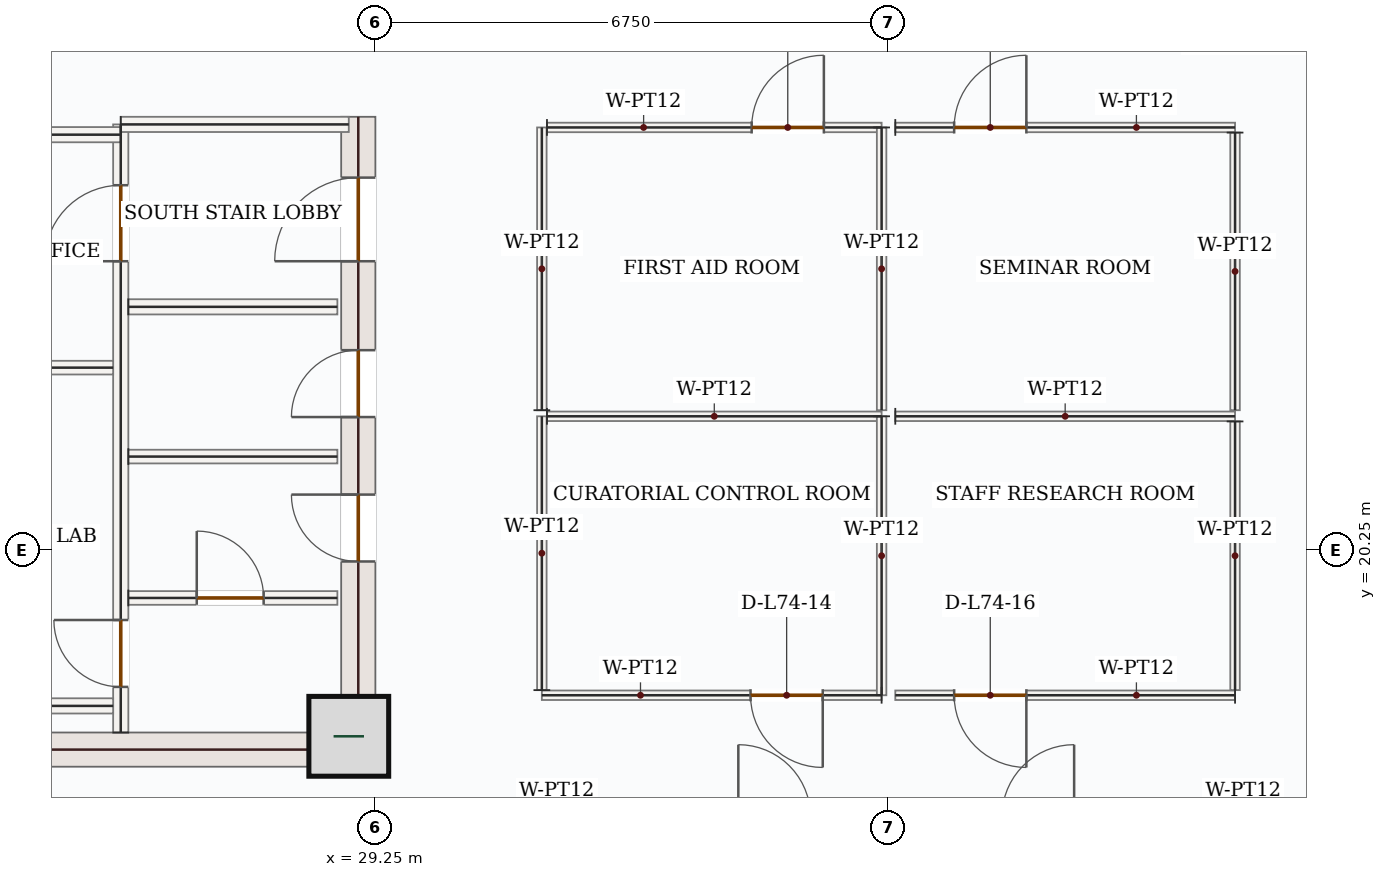
"""IFC4 building model, lengths in metres.
Left out: names, types, materials, properties, quantities, classifications, styles, units other than length and angle.
Written with IfcOpenShell. Run it as: python <this file> out.ifc"""

import sys

from ifc_helpers import new_model, si_unit, direction, frame, frame_2d, origin, origin_2d, place, context, subcontext, project, spatial, rectangle, extrude, source, transform, mapped, element, fill, save


model = new_model("IFC4")
c1 = context("Model", 3, precision=1e-05, world=origin(), true_north=direction((0.0, 1.0)))
c2 = subcontext(c1, "Body", "Model", "MODEL_VIEW")
j1 = project(units=[si_unit("LENGTHUNIT", "METRE"), si_unit("PLANEANGLEUNIT", "RADIAN")], contexts=[c1])
p1 = place(None, origin())
s1 = spatial("IfcSite", under=j1, at=p1, CompositionType="ELEMENT")
p2 = place(p1, origin())
s2 = spatial("IfcBuilding", under=s1, at=p2, CompositionType="ELEMENT")
p3 = place(p2, frame((0.0, 0.0, 306.6)))
s3 = spatial("IfcBuildingStorey", under=s2, at=p3, CompositionType="ELEMENT", Elevation=306.6)
p4 = place(p3, frame((29.025, 17.4, 0.0), z_axis=(0.0, 0.0, 1.0), x_axis=(0.0, 1.0, 0.0)))
e1 = element("IfcWall", 1, at=p4, inside=s3, PredefinedType="SHEAR", context=c2, shape_type="SweptSolid", body=[
    extrude(rectangle(XDim=8.55, YDim=0.45, at=frame_2d((4.275, 0.0))), origin(), (0.0, 0.0, 1.0), 3.5),
])
p5 = place(p4, frame((6.65, 0.0, 0.0)))
e2 = element("IfcOpeningElement", 2, at=p5, cuts=e1, PredefinedType="OPENING", context=c2, shape_type="SweptSolid", body=[
    extrude(rectangle(XDim=1.1, YDim=2.2, at=frame_2d((0.55, 1.1))), frame((0.0, 0.235, 0.0), z_axis=(0.0, -1.0, 0.0), x_axis=(1.0, 0.0, 0.0)), (0.0, 0.0, 1.0), 0.47),
])
p6 = place(p4, frame((2.7, 0.0, 0.0)))
e3 = element("IfcOpeningElement", 3, at=p6, cuts=e1, PredefinedType="OPENING", context=c2, shape_type="SweptSolid", body=[
    extrude(rectangle(XDim=0.88, YDim=2.1, at=frame_2d((0.44, 1.05))), frame((0.0, 0.235, 0.0), z_axis=(0.0, -1.0, 0.0), x_axis=(1.0, 0.0, 0.0)), (0.0, 0.0, 1.0), 0.47),
])
p7 = place(p4, frame((4.6, 0.0, 0.0)))
e4 = element("IfcOpeningElement", 4, at=p7, cuts=e1, PredefinedType="OPENING", context=c2, shape_type="SweptSolid", body=[
    extrude(rectangle(XDim=0.88, YDim=2.1, at=frame_2d((0.44, 1.05))), frame((0.0, 0.235, 0.0), z_axis=(0.0, -1.0, 0.0), x_axis=(1.0, 0.0, 0.0)), (0.0, 0.0, 1.0), 0.47),
])
m1 = source(origin(), c2, "Body", "SweptSolid", [
    extrude(rectangle(XDim=7.1, YDim=0.45, at=frame_2d((3.55, 0.0))), origin(), (0.0, 0.0, 1.0), 3.5),
])
p8 = place(p3, frame((21.7, 17.625, 0.0), z_axis=(0.0, 0.0, 1.0), x_axis=(1.0, 0.0, 0.0)))
e5 = element("IfcWall", 5, at=p8, inside=s3, PredefinedType="SHEAR", context=c2, shape_type="MappedRepresentation", body=[
    mapped(m1, transform((0.0, 0.0, 0.0), x_axis=(1.0, 0.0, 0.0), y_axis=(0.0, 1.0, 0.0), z_axis=(0.0, 0.0, 1.0), scale=1.0)),
])
m2 = source(origin(), c2, "Body", "SweptSolid", [
    extrude(rectangle(XDim=1.05, YDim=1.05, at=origin_2d()), origin(), (0.0, 0.0, 1.0), 3.75),
])
p9 = place(p3, frame((28.9, 17.8, 0.0), z_axis=(0.0, 0.0, 1.0), x_axis=(1.0, 0.0, 0.0)))
e6 = element("IfcColumn", 6, at=p9, inside=s3, PredefinedType="COLUMN", context=c2, shape_type="MappedRepresentation", body=[
    mapped(m2, transform((0.0, 0.0, 0.0), x_axis=(1.0, 0.0, 0.0), y_axis=(0.0, 1.0, 0.0), z_axis=(0.0, 0.0, 1.0), scale=1.0)),
])
p10 = place(p3, frame((27.09, 10.351, 0.0), z_axis=(0.0, 0.0, 1.0), x_axis=(-0.726772856404, 0.686877875022, 0.0)))
e7 = element("IfcWall", 7, at=p10, inside=s3, PredefinedType="SOLIDWALL", context=c2, shape_type="SweptSolid", body=[
    extrude(rectangle(XDim=9.92, YDim=0.28, at=frame_2d((4.96, 0.0))), origin(), (0.0, 0.0, 1.0), 3.5),
])
p11 = place(p10, frame((4.21, 0.0, 0.85)))
e8 = element("IfcOpeningElement", 8, at=p11, cuts=e7, PredefinedType="OPENING", context=c2, shape_type="SweptSolid", body=[
    extrude(rectangle(XDim=1.5, YDim=1.5, at=frame_2d((0.75, 0.75))), frame((0.0, 0.15, 0.0), z_axis=(0.0, -1.0, 0.0), x_axis=(1.0, 0.0, 0.0)), (0.0, 0.0, 1.0), 0.3),
])
p12 = place(p3, frame((25.9, 17.85, 0.0), z_axis=(0.0, 0.0, 1.0), x_axis=(0.0, 1.0, 0.0)))
e9 = element("IfcWall", 9, at=p12, inside=s3, PredefinedType="SOLIDWALL", context=c2, shape_type="SweptSolid", body=[
    extrude(rectangle(XDim=8.0, YDim=0.2, at=frame_2d((4.0, 0.0))), origin(), (0.0, 0.0, 1.0), 3.5),
])
p13 = place(p12, frame((6.2, 0.0, 0.0)))
e10 = element("IfcOpeningElement", 10, at=p13, cuts=e9, PredefinedType="OPENING", context=c2, shape_type="SweptSolid", body=[
    extrude(rectangle(XDim=1.0, YDim=2.15, at=frame_2d((0.5, 1.075))), frame((0.0, 0.11, 0.0), z_axis=(0.0, -1.0, 0.0), x_axis=(1.0, 0.0, 0.0)), (0.0, 0.0, 1.0), 0.22),
])
p14 = place(p12, frame((0.6, 0.0, 0.0)))
e11 = element("IfcOpeningElement", 11, at=p14, cuts=e9, PredefinedType="OPENING", context=c2, shape_type="SweptSolid", body=[
    extrude(rectangle(XDim=0.88, YDim=2.1, at=frame_2d((0.44, 1.05))), frame((0.0, 0.11, 0.0), z_axis=(0.0, -1.0, 0.0), x_axis=(1.0, 0.0, 0.0)), (0.0, 0.0, 1.0), 0.22),
])
m3 = source(origin(), c2, "Body", "SweptSolid", [
    extrude(rectangle(XDim=4.25, YDim=0.2, at=frame_2d((2.125, 0.0))), origin(), (0.0, 0.0, 1.0), 3.5),
])
p15 = place(p3, frame((21.65, 25.715, 0.0), z_axis=(0.0, 0.0, 1.0), x_axis=(1.0, 0.0, 0.0)))
e12 = element("IfcWall", 12, at=p15, inside=s3, PredefinedType="SOLIDWALL", context=c2, shape_type="MappedRepresentation", body=[
    mapped(m3, transform((0.0, 0.0, 0.0), x_axis=(1.0, 0.0, 0.0), y_axis=(0.0, 1.0, 0.0), z_axis=(0.0, 0.0, 1.0), scale=1.0)),
])
m4 = source(origin(), c2, "Body", "SweptSolid", [
    extrude(rectangle(XDim=3.0, YDim=0.2, at=frame_2d((1.5, 0.0))), origin(), (0.0, 0.0, 1.0), 3.5),
])
p16 = place(p3, frame((25.9, 25.85, 0.0), z_axis=(0.0, 0.0, 1.0), x_axis=(1.0, 0.0, 0.0)))
e13 = element("IfcWall", 13, at=p16, inside=s3, PredefinedType="SOLIDWALL", context=c2, shape_type="MappedRepresentation", body=[
    mapped(m4, transform((0.0, 0.0, 0.0), x_axis=(1.0, 0.0, 0.0), y_axis=(0.0, 1.0, 0.0), z_axis=(0.0, 0.0, 1.0), scale=1.0)),
])
m5 = source(origin(), c2, "Body", "SweptSolid", [
    extrude(rectangle(XDim=3.25, YDim=0.2, at=frame_2d((1.625, 0.0))), origin(), (0.0, 0.0, 1.0), 3.5),
])
p17 = place(p3, frame((22.55, 18.2, 0.0), z_axis=(0.0, 0.0, 1.0), x_axis=(1.0, 0.0, 0.0)))
e14 = element("IfcWall", 14, at=p17, inside=s3, PredefinedType="SOLIDWALL", context=c2, shape_type="MappedRepresentation", body=[
    mapped(m5, transform((0.0, 0.0, 0.0), x_axis=(1.0, 0.0, 0.0), y_axis=(0.0, 1.0, 0.0), z_axis=(0.0, 0.0, 1.0), scale=1.0)),
])
m6 = source(origin(), c2, "Body", "SweptSolid", [
    extrude(rectangle(XDim=3.25, YDim=0.18, at=frame_2d((1.625, 0.0))), origin(), (0.0, 0.0, 1.0), 3.5),
])
p18 = place(p3, frame((22.55, 22.65, 0.0), z_axis=(0.0, 0.0, 1.0), x_axis=(1.0, 0.0, 0.0)))
e15 = element("IfcWall", 15, at=p18, inside=s3, PredefinedType="PARTITIONING", context=c2, shape_type="MappedRepresentation", body=[
    mapped(m6, transform((0.0, 0.0, 0.0), x_axis=(1.0, 0.0, 0.0), y_axis=(0.0, 1.0, 0.0), z_axis=(0.0, 0.0, 1.0), scale=1.0)),
])
m7 = source(origin(), c2, "Body", "SweptSolid", [
    extrude(rectangle(XDim=2.75, YDim=0.2, at=frame_2d((1.375, 0.0))), origin(), (0.0, 0.0, 1.0), 3.5),
])
p19 = place(p3, frame((26.0, 23.45, 0.0), z_axis=(0.0, 0.0, 1.0), x_axis=(1.0, 0.0, 0.0)))
e16 = element("IfcWall", 16, at=p19, inside=s3, PredefinedType="SOLIDWALL", context=c2, shape_type="MappedRepresentation", body=[
    mapped(m7, transform((0.0, 0.0, 0.0), x_axis=(1.0, 0.0, 0.0), y_axis=(0.0, 1.0, 0.0), z_axis=(0.0, 0.0, 1.0), scale=1.0)),
])
p20 = place(p3, frame((26.0, 19.62, 0.0), z_axis=(0.0, 0.0, 1.0), x_axis=(1.0, 0.0, 0.0)))
e17 = element("IfcWall", 17, at=p20, inside=s3, PredefinedType="PARTITIONING", context=c2, shape_type="SweptSolid", body=[
    extrude(rectangle(XDim=2.75, YDim=0.18, at=frame_2d((1.375, 0.0))), origin(), (0.0, 0.0, 1.0), 3.5),
])
p21 = place(p20, frame((0.9, 0.0, 0.0)))
e18 = element("IfcOpeningElement", 18, at=p21, cuts=e17, PredefinedType="OPENING", context=c2, shape_type="SweptSolid", body=[
    extrude(rectangle(XDim=0.88, YDim=2.1, at=frame_2d((0.44, 1.05))), frame((0.0, 0.1, 0.0), z_axis=(0.0, -1.0, 0.0), x_axis=(1.0, 0.0, 0.0)), (0.0, 0.0, 1.0), 0.2),
])
m8 = source(origin(), c2, "Body", "SweptSolid", [
    extrude(rectangle(XDim=2.75, YDim=0.18, at=frame_2d((1.375, 0.0))), origin(), (0.0, 0.0, 1.0), 3.5),
])
p22 = place(p3, frame((26.0, 21.48, 0.0), z_axis=(0.0, 0.0, 1.0), x_axis=(1.0, 0.0, 0.0)))
e19 = element("IfcWall", 19, at=p22, inside=s3, PredefinedType="PARTITIONING", context=c2, shape_type="MappedRepresentation", body=[
    mapped(m8, transform((0.0, 0.0, 0.0), x_axis=(1.0, 0.0, 0.0), y_axis=(0.0, 1.0, 0.0), z_axis=(0.0, 0.0, 1.0), scale=1.0)),
])
p23 = place(p3, frame((35.91, 18.34, 0.0), z_axis=(0.0, 0.0, 1.0), x_axis=(-1.0, 0.0, 0.0)))
e20 = element("IfcWall", 20, at=p23, inside=s3, PredefinedType="PARTITIONING", context=c2, shape_type="SweptSolid", body=[
    extrude(rectangle(XDim=4.47, YDim=0.125, at=frame_2d((2.235, 0.0))), origin(), (0.0, 0.0, 1.0), 3.5),
])
p24 = place(p23, frame((0.774, 0.0, 0.0)))
e21 = element("IfcOpeningElement", 21, at=p24, cuts=e20, PredefinedType="OPENING", context=c2, shape_type="SweptSolid", body=[
    extrude(rectangle(XDim=0.95, YDim=2.15, at=frame_2d((0.475, 1.075))), frame((0.0, 0.073, 0.0), z_axis=(0.0, -1.0, 0.0), x_axis=(1.0, 0.0, 0.0)), (0.0, 0.0, 1.0), 0.145),
])
m9 = source(origin(), c2, "Body", "SweptSolid", [
    extrude(rectangle(XDim=3.603, YDim=0.125, at=frame_2d((1.801, 0.0))), origin(), (0.0, 0.0, 1.0), 3.5),
])
p25 = place(p3, frame((31.44, 18.407, 0.0), z_axis=(0.0, 0.0, 1.0), x_axis=(0.0, 1.0, 0.0)))
e22 = element("IfcWall", 22, at=p25, inside=s3, PredefinedType="PARTITIONING", context=c2, shape_type="MappedRepresentation", body=[
    mapped(m9, transform((0.0, 0.0, 0.0), x_axis=(1.0, 0.0, 0.0), y_axis=(0.0, 1.0, 0.0), z_axis=(0.0, 0.0, 1.0), scale=1.0)),
])
m10 = source(origin(), c2, "Body", "SweptSolid", [
    extrude(rectangle(XDim=4.402, YDim=0.125, at=frame_2d((2.201, 0.0))), origin(), (0.0, 0.0, 1.0), 3.5),
])
p26 = place(p3, frame((31.508, 22.01, 0.0), z_axis=(0.0, 0.0, 1.0), x_axis=(1.0, 0.0, 0.0)))
e23 = element("IfcWall", 23, at=p26, inside=s3, PredefinedType="PARTITIONING", context=c2, shape_type="MappedRepresentation", body=[
    mapped(m10, transform((0.0, 0.0, 0.0), x_axis=(1.0, 0.0, 0.0), y_axis=(0.0, 1.0, 0.0), z_axis=(0.0, 0.0, 1.0), scale=1.0)),
])
m11 = source(origin(), c2, "Body", "SweptSolid", [
    extrude(rectangle(XDim=3.67, YDim=0.125, at=frame_2d((1.835, 0.0))), origin(), (0.0, 0.0, 1.0), 3.5),
])
p27 = place(p3, frame((35.91, 22.01, 0.0), z_axis=(0.0, 0.0, 1.0), x_axis=(0.0, -1.0, 0.0)))
e24 = element("IfcWall", 24, at=p27, inside=s3, PredefinedType="PARTITIONING", context=c2, shape_type="MappedRepresentation", body=[
    mapped(m11, transform((0.0, 0.0, 0.0), x_axis=(1.0, 0.0, 0.0), y_axis=(0.0, 1.0, 0.0), z_axis=(0.0, 0.0, 1.0), scale=1.0)),
])
p28 = place(p3, frame((40.56, 18.34, 0.0), z_axis=(0.0, 0.0, 1.0), x_axis=(-1.0, 0.0, 0.0)))
e25 = element("IfcWall", 25, at=p28, inside=s3, PredefinedType="PARTITIONING", context=c2, shape_type="SweptSolid", body=[
    extrude(rectangle(XDim=4.47, YDim=0.125, at=frame_2d((2.235, 0.0))), origin(), (0.0, 0.0, 1.0), 3.5),
])
p29 = place(p28, frame((2.746, 0.0, 0.0)))
e26 = element("IfcOpeningElement", 26, at=p29, cuts=e25, PredefinedType="OPENING", context=c2, shape_type="SweptSolid", body=[
    extrude(rectangle(XDim=0.95, YDim=2.15, at=frame_2d((0.475, 1.075))), frame((0.0, 0.073, 0.0), z_axis=(0.0, -1.0, 0.0), x_axis=(1.0, 0.0, 0.0)), (0.0, 0.0, 1.0), 0.145),
])
m12 = source(origin(), c2, "Body", "SweptSolid", [
    extrude(rectangle(XDim=4.47, YDim=0.125, at=frame_2d((2.235, 0.0))), origin(), (0.0, 0.0, 1.0), 3.5),
])
p30 = place(p3, frame((36.09, 22.01, 0.0), z_axis=(0.0, 0.0, 1.0), x_axis=(1.0, 0.0, 0.0)))
e27 = element("IfcWall", 27, at=p30, inside=s3, PredefinedType="PARTITIONING", context=c2, shape_type="MappedRepresentation", body=[
    mapped(m12, transform((0.0, 0.0, 0.0), x_axis=(1.0, 0.0, 0.0), y_axis=(0.0, 1.0, 0.0), z_axis=(0.0, 0.0, 1.0), scale=1.0)),
])
m13 = source(origin(), c2, "Body", "SweptSolid", [
    extrude(rectangle(XDim=3.535, YDim=0.125, at=frame_2d((1.768, 0.0))), origin(), (0.0, 0.0, 1.0), 3.5),
])
p31 = place(p3, frame((40.56, 21.942, 0.0), z_axis=(0.0, 0.0, 1.0), x_axis=(0.0, -1.0, 0.0)))
e28 = element("IfcWall", 28, at=p31, inside=s3, PredefinedType="PARTITIONING", context=c2, shape_type="MappedRepresentation", body=[
    mapped(m13, transform((0.0, 0.0, 0.0), x_axis=(1.0, 0.0, 0.0), y_axis=(0.0, 1.0, 0.0), z_axis=(0.0, 0.0, 1.0), scale=1.0)),
])
m14 = source(origin(), c2, "Body", "SweptSolid", [
    extrude(rectangle(XDim=3.72, YDim=0.125, at=frame_2d((1.86, 0.0))), origin(), (0.0, 0.0, 1.0), 3.5),
])
p32 = place(p3, frame((31.44, 22.09, 0.0), z_axis=(0.0, 0.0, 1.0), x_axis=(0.0, 1.0, 0.0)))
e29 = element("IfcWall", 29, at=p32, inside=s3, PredefinedType="PARTITIONING", context=c2, shape_type="MappedRepresentation", body=[
    mapped(m14, transform((0.0, 0.0, 0.0), x_axis=(1.0, 0.0, 0.0), y_axis=(0.0, 1.0, 0.0), z_axis=(0.0, 0.0, 1.0), scale=1.0)),
])
p33 = place(p3, frame((31.508, 25.81, 0.0), z_axis=(0.0, 0.0, 1.0), x_axis=(1.0, 0.0, 0.0)))
e30 = element("IfcWall", 30, at=p33, inside=s3, PredefinedType="PARTITIONING", context=c2, shape_type="SweptSolid", body=[
    extrude(rectangle(XDim=4.402, YDim=0.125, at=frame_2d((2.201, 0.0))), origin(), (0.0, 0.0, 1.0), 3.5),
])
p34 = place(p33, frame((2.693, 0.0, 0.0)))
e31 = element("IfcOpeningElement", 31, at=p34, cuts=e30, PredefinedType="OPENING", context=c2, shape_type="SweptSolid", body=[
    extrude(rectangle(XDim=0.95, YDim=2.15, at=frame_2d((0.475, 1.075))), frame((0.0, 0.073, 0.0), z_axis=(0.0, -1.0, 0.0), x_axis=(1.0, 0.0, 0.0)), (0.0, 0.0, 1.0), 0.145),
])
p35 = place(p3, frame((35.91, 25.81, 0.0), z_axis=(0.0, 0.0, 1.0), x_axis=(0.0, -1.0, 0.0)))
e32 = element("IfcWall", 32, at=p35, inside=s3, PredefinedType="PARTITIONING", context=c2, shape_type="MappedRepresentation", body=[
    mapped(m14, transform((0.0, 0.0, 0.0), x_axis=(1.0, 0.0, 0.0), y_axis=(0.0, 1.0, 0.0), z_axis=(0.0, 0.0, 1.0), scale=1.0)),
])
p36 = place(p3, frame((36.09, 25.81, 0.0), z_axis=(0.0, 0.0, 1.0), x_axis=(1.0, 0.0, 0.0)))
e33 = element("IfcWall", 33, at=p36, inside=s3, PredefinedType="PARTITIONING", context=c2, shape_type="SweptSolid", body=[
    extrude(rectangle(XDim=4.47, YDim=0.125, at=frame_2d((2.235, 0.0))), origin(), (0.0, 0.0, 1.0), 3.5),
])
p37 = place(p36, frame((0.774, 0.0, 0.0)))
e34 = element("IfcOpeningElement", 34, at=p37, cuts=e33, PredefinedType="OPENING", context=c2, shape_type="SweptSolid", body=[
    extrude(rectangle(XDim=0.95, YDim=2.15, at=frame_2d((0.475, 1.075))), frame((0.0, 0.073, 0.0), z_axis=(0.0, -1.0, 0.0), x_axis=(1.0, 0.0, 0.0)), (0.0, 0.0, 1.0), 0.145),
])
m15 = source(origin(), c2, "Body", "SweptSolid", [
    extrude(rectangle(XDim=3.652, YDim=0.125, at=frame_2d((1.826, 0.0))), origin(), (0.0, 0.0, 1.0), 3.5),
])
p38 = place(p3, frame((40.56, 25.742, 0.0), z_axis=(0.0, 0.0, 1.0), x_axis=(0.0, -1.0, 0.0)))
e35 = element("IfcWall", 35, at=p38, inside=s3, PredefinedType="PARTITIONING", context=c2, shape_type="MappedRepresentation", body=[
    mapped(m15, transform((0.0, 0.0, 0.0), x_axis=(1.0, 0.0, 0.0), y_axis=(0.0, 1.0, 0.0), z_axis=(0.0, 0.0, 1.0), scale=1.0)),
])
m16 = source(origin(), c2, "Body", "SweptSolid", [
    extrude(rectangle(XDim=1.0, YDim=2.15, at=frame_2d((0.5, 1.075))), frame((0.0, 0.025, 0.0), z_axis=(0.0, -1.0, 0.0), x_axis=(1.0, 0.0, 0.0)), (0.0, 0.0, 1.0), 0.05),
])
p39 = place(p13, origin())
e36 = element("IfcDoor", 36, at=p39, inside=s3, OperationType="SINGLE_SWING_LEFT", PredefinedType="DOOR", context=c2, shape_type="MappedRepresentation", body=[
    mapped(m16, transform((0.0, 0.0, 0.0), x_axis=(1.0, 0.0, 0.0), y_axis=(0.0, 1.0, 0.0), z_axis=(0.0, 0.0, 1.0), scale=1.0)),
])
fill(e10, e36)
m17 = source(origin(), c2, "Body", "SweptSolid", [
    extrude(rectangle(XDim=0.88, YDim=2.1, at=frame_2d((0.44, 1.05))), frame((0.0, 0.025, 0.0), z_axis=(0.0, -1.0, 0.0), x_axis=(1.0, 0.0, 0.0)), (0.0, 0.0, 1.0), 0.05),
])
p40 = place(p14, origin())
e37 = element("IfcDoor", 37, at=p40, inside=s3, OperationType="SINGLE_SWING_RIGHT", PredefinedType="DOOR", context=c2, shape_type="MappedRepresentation", body=[
    mapped(m17, transform((0.0, 0.0, 0.0), x_axis=(1.0, 0.0, 0.0), y_axis=(0.0, 1.0, 0.0), z_axis=(0.0, 0.0, 1.0), scale=1.0)),
])
fill(e11, e37)
m18 = source(origin(), c2, "Body", "SweptSolid", [
    extrude(rectangle(XDim=1.1, YDim=2.2, at=frame_2d((0.55, 1.1))), frame((0.0, 0.025, 0.0), z_axis=(0.0, -1.0, 0.0), x_axis=(1.0, 0.0, 0.0)), (0.0, 0.0, 1.0), 0.05),
])
p41 = place(p5, origin())
e38 = element("IfcDoor", 38, at=p41, inside=s3, OperationType="SINGLE_SWING_LEFT", PredefinedType="DOOR", context=c2, shape_type="MappedRepresentation", body=[
    mapped(m18, transform((0.0, 0.0, 0.0), x_axis=(1.0, 0.0, 0.0), y_axis=(0.0, 1.0, 0.0), z_axis=(0.0, 0.0, 1.0), scale=1.0)),
])
fill(e2, e38)
p42 = place(p21, origin())
e39 = element("IfcDoor", 39, at=p42, inside=s3, OperationType="SINGLE_SWING_LEFT", PredefinedType="DOOR", context=c2, shape_type="MappedRepresentation", body=[
    mapped(m17, transform((0.0, 0.0, 0.0), x_axis=(1.0, 0.0, 0.0), y_axis=(0.0, 1.0, 0.0), z_axis=(0.0, 0.0, 1.0), scale=1.0)),
])
fill(e18, e39)
p43 = place(p6, origin())
e40 = element("IfcDoor", 40, at=p43, inside=s3, OperationType="SINGLE_SWING_RIGHT", PredefinedType="DOOR", context=c2, shape_type="MappedRepresentation", body=[
    mapped(m17, transform((0.0, 0.0, 0.0), x_axis=(1.0, 0.0, 0.0), y_axis=(0.0, 1.0, 0.0), z_axis=(0.0, 0.0, 1.0), scale=1.0)),
])
fill(e3, e40)
p44 = place(p7, origin())
e41 = element("IfcDoor", 41, at=p44, inside=s3, OperationType="SINGLE_SWING_LEFT", PredefinedType="DOOR", context=c2, shape_type="MappedRepresentation", body=[
    mapped(m17, transform((0.0, 0.0, 0.0), x_axis=(1.0, 0.0, 0.0), y_axis=(0.0, 1.0, 0.0), z_axis=(0.0, 0.0, 1.0), scale=1.0)),
])
fill(e4, e41)
m19 = source(origin(), c2, "Body", "SweptSolid", [
    extrude(rectangle(XDim=0.95, YDim=2.15, at=frame_2d((0.475, 1.075))), frame((0.0, 0.025, 0.0), z_axis=(0.0, -1.0, 0.0), x_axis=(1.0, 0.0, 0.0)), (0.0, 0.0, 1.0), 0.05),
])
p45 = place(p24, origin())
e42 = element("IfcDoor", 42, at=p45, inside=s3, OperationType="SINGLE_SWING_LEFT", PredefinedType="DOOR", context=c2, shape_type="MappedRepresentation", body=[
    mapped(m19, transform((0.0, 0.0, 0.0), x_axis=(1.0, 0.0, 0.0), y_axis=(0.0, 1.0, 0.0), z_axis=(0.0, 0.0, 1.0), scale=1.0)),
])
fill(e21, e42)
p46 = place(p34, origin())
e43 = element("IfcDoor", 43, at=p46, inside=s3, OperationType="SINGLE_SWING_RIGHT", PredefinedType="DOOR", context=c2, shape_type="MappedRepresentation", body=[
    mapped(m19, transform((0.0, 0.0, 0.0), x_axis=(1.0, 0.0, 0.0), y_axis=(0.0, 1.0, 0.0), z_axis=(0.0, 0.0, 1.0), scale=1.0)),
])
fill(e31, e43)
p47 = place(p29, origin())
e44 = element("IfcDoor", 44, at=p47, inside=s3, OperationType="SINGLE_SWING_LEFT", PredefinedType="DOOR", context=c2, shape_type="MappedRepresentation", body=[
    mapped(m19, transform((0.0, 0.0, 0.0), x_axis=(1.0, 0.0, 0.0), y_axis=(0.0, 1.0, 0.0), z_axis=(0.0, 0.0, 1.0), scale=1.0)),
])
fill(e26, e44)
p48 = place(p37, origin())
e45 = element("IfcDoor", 45, at=p48, inside=s3, OperationType="SINGLE_SWING_RIGHT", PredefinedType="DOOR", context=c2, shape_type="MappedRepresentation", body=[
    mapped(m19, transform((0.0, 0.0, 0.0), x_axis=(1.0, 0.0, 0.0), y_axis=(0.0, 1.0, 0.0), z_axis=(0.0, 0.0, 1.0), scale=1.0)),
])
fill(e34, e45)
save(model, sys.argv[1])
